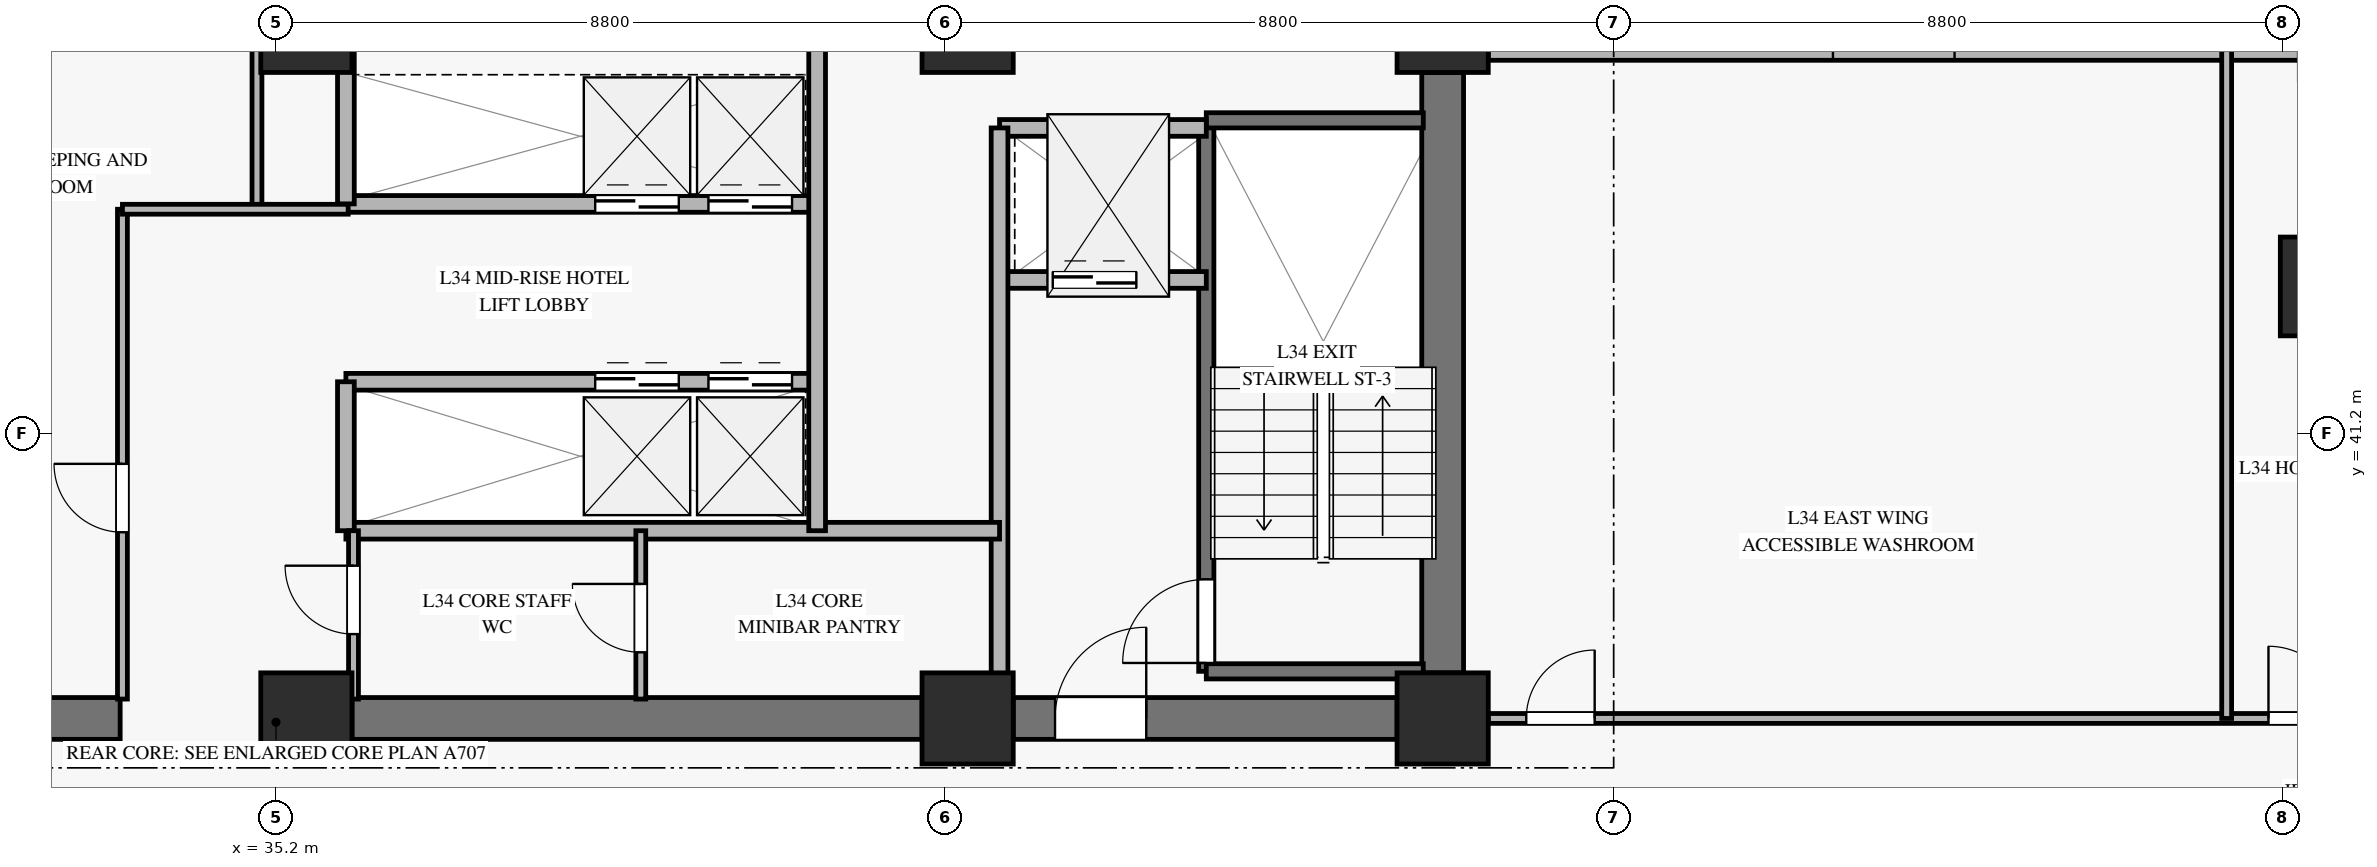
"""IFC4 building model, lengths in metres.
Left out: names, types, materials, properties, quantities, classifications, styles, units other than length and angle.
Written with IfcOpenShell. Run it as: python <this file> out.ifc"""

import sys

from ifc_helpers import new_model, si_unit, direction, frame, frame_2d, origin, origin_2d, place, context, subcontext, project, spatial, rectangle, hollow_rectangle, extrude, source, transform, mapped, element, fill, save


model = new_model("IFC4")
c1 = context("Model", 3, precision=1e-05, world=origin(), true_north=direction((0.0, 1.0)))
c2 = subcontext(c1, "Body", "Model", "MODEL_VIEW")
j1 = project(units=[si_unit("LENGTHUNIT", "METRE"), si_unit("PLANEANGLEUNIT", "RADIAN")], contexts=[c1])
p1 = place(None, origin())
s1 = spatial("IfcSite", under=j1, at=p1, CompositionType="ELEMENT")
p2 = place(p1, origin())
s2 = spatial("IfcBuilding", under=s1, at=p2, CompositionType="ELEMENT")
p3 = place(p2, frame((0.0, 0.0, 141.2)))
s3 = spatial("IfcBuildingStorey", under=s2, at=p3, CompositionType="ELEMENT", Elevation=141.2)
m1 = source(origin(), c2, "Body", "SweptSolid", [
    extrude(rectangle(XDim=1.2, YDim=1.2, at=origin_2d()), origin(), (0.0, 0.0, 1.0), 3.22),
])
for number, where, z_axis, x_axis in (
    (1, (35.6, 37.45, 0.0), (0.0, 0.0, 1.0), (1.0, 0.0, 0.0)),
    (2, (35.6, 46.55, 0.0), (0.0, 0.0, 1.0), (1.0, 0.0, 0.0)),
    (3, (44.3, 37.45, 0.0), (0.0, 0.0, 1.0), (1.0, 0.0, 0.0)),
    (4, (44.3, 46.55, 0.0), (0.0, 0.0, 1.0), (1.0, 0.0, 0.0)),
    (5, (50.55, 37.45, 0.0), (0.0, 0.0, 1.0), (1.0, 0.0, 0.0)),
    (6, (50.55, 46.55, 0.0), (0.0, 0.0, 1.0), (1.0, 0.0, 0.0)),
):
    element("IfcColumn", number, at=place(p3, frame(where, z_axis=z_axis, x_axis=x_axis)), inside=s3, PredefinedType="PILASTER", context=c2, shape_type="MappedRepresentation", body=[
        mapped(m1, transform((0.0, 0.0, 0.0), x_axis=(1.0, 0.0, 0.0), y_axis=(0.0, 1.0, 0.0), z_axis=(0.0, 0.0, 1.0), scale=1.0)),
    ])
p4 = place(p3, frame((31.4, 37.45, 0.0), z_axis=(0.0, 0.0, 1.0), x_axis=(1.0, 0.0, 0.0)))
e7 = element("IfcWall", 7, at=p4, inside=s3, PredefinedType="SHEAR", context=c2, shape_type="SweptSolid", body=[
    extrude(rectangle(XDim=1.75, YDim=0.55, at=frame_2d((0.875, 0.0))), origin(), (0.0, 0.0, 1.0), 3.22),
])
p5 = place(p3, frame((36.2, 37.45, 0.0), z_axis=(0.0, 0.0, 1.0), x_axis=(1.0, 0.0, 0.0)))
e8 = element("IfcWall", 8, at=p5, inside=s3, PredefinedType="SHEAR", context=c2, shape_type="SweptSolid", body=[
    extrude(rectangle(XDim=7.5, YDim=0.55, at=frame_2d((3.75, 0.0))), origin(), (0.0, 0.0, 1.0), 3.22),
])
p6 = place(p3, frame((44.9, 37.45, 0.0), z_axis=(0.0, 0.0, 1.0), x_axis=(1.0, 0.0, 0.0)))
e9 = element("IfcWall", 9, at=p6, inside=s3, PredefinedType="SHEAR", context=c2, shape_type="SweptSolid", body=[
    extrude(rectangle(XDim=5.05, YDim=0.55, at=frame_2d((2.525, 0.0))), origin(), (0.0, 0.0, 1.0), 3.22),
])
p7 = place(p6, frame((0.55, 0.0, 0.0)))
e10 = element("IfcOpeningElement", 10, at=p7, cuts=e9, PredefinedType="OPENING", context=c2, shape_type="SweptSolid", body=[
    extrude(rectangle(XDim=1.2, YDim=2.15, at=frame_2d((0.6, 1.075))), frame((0.0, 0.285, 0.0), z_axis=(0.0, -1.0, 0.0), x_axis=(1.0, 0.0, 0.0)), (0.0, 0.0, 1.0), 0.57),
])
p8 = place(p3, frame((50.55, 38.05, 0.0), z_axis=(0.0, 0.0, 1.0), x_axis=(0.0, 1.0, 0.0)))
e11 = element("IfcWall", 11, at=p8, inside=s3, PredefinedType="SHEAR", context=c2, shape_type="SweptSolid", body=[
    extrude(rectangle(XDim=7.9, YDim=0.55, at=frame_2d((3.95, 0.0))), origin(), (0.0, 0.0, 1.0), 3.22),
])
m2 = source(origin(), c2, "Body", "SweptSolid", [
    extrude(hollow_rectangle(XDim=1.3, YDim=1.3, WallThickness=0.06, at=origin_2d()), origin(), (0.0, 0.0, 1.0), 3.22),
])
p9 = place(p3, frame((62.221, 43.134, 0.0), z_axis=(0.0, 0.0, 1.0), x_axis=(1.0, 0.0, 0.0)))
e12 = element("IfcColumn", 12, at=p9, inside=s3, PredefinedType="COLUMN", context=c2, shape_type="MappedRepresentation", body=[
    mapped(m2, transform((0.0, 0.0, 0.0), x_axis=(1.0, 0.0, 0.0), y_axis=(0.0, 1.0, 0.0), z_axis=(0.0, 0.0, 1.0), scale=1.0)),
])
p10 = place(p3, frame((51.15, 46.25, 0.0), z_axis=(0.0, 0.0, 1.0), x_axis=(1.0, 0.0, 0.0)))
e13 = element("IfcWall", 13, at=p10, inside=s3, PredefinedType="SOLIDWALL", context=c2, shape_type="SweptSolid", body=[
    extrude(rectangle(XDim=10.671, YDim=0.28, at=frame_2d((5.335, 0.0))), origin(), (0.0, 0.0, 1.0), 2.7),
])
p11 = place(p10, frame((4.535, 0.0, 0.45)))
e14 = element("IfcOpeningElement", 14, at=p11, cuts=e13, PredefinedType="OPENING", context=c2, shape_type="SweptSolid", body=[
    extrude(rectangle(XDim=1.6, YDim=2.0, at=frame_2d((0.8, 1.0))), frame((0.0, 0.15, 0.0), z_axis=(0.0, -1.0, 0.0), x_axis=(1.0, 0.0, 0.0)), (0.0, 0.0, 1.0), 0.3),
])
p12 = place(p3, frame((47.44, 38.07, 0.0), z_axis=(0.0, 0.0, 1.0), x_axis=(0.0, 1.0, 0.0)))
e15 = element("IfcWall", 15, at=p12, inside=s3, PredefinedType="SOLIDWALL", context=c2, shape_type="SweptSolid", body=[
    extrude(rectangle(XDim=7.25, YDim=0.2, at=frame_2d((3.625, 0.0))), origin(), (0.0, 0.0, 1.0), 3.5),
])
p13 = place(p12, frame((0.11, 0.0, 0.0)))
e16 = element("IfcOpeningElement", 16, at=p13, cuts=e15, PredefinedType="OPENING", context=c2, shape_type="SweptSolid", body=[
    extrude(rectangle(XDim=1.1, YDim=2.15, at=frame_2d((0.55, 1.075))), frame((0.0, 0.11, 0.0), z_axis=(0.0, -1.0, 0.0), x_axis=(1.0, 0.0, 0.0)), (0.0, 0.0, 1.0), 0.22),
])
for number, where, z_axis, x_axis in (
    (17, (47.44, 45.32, 0.0), (0.0, 0.0, 1.0), (1.0, 0.0, 0.0)),
    (18, (47.44, 38.07, 0.0), (0.0, 0.0, 1.0), (1.0, 0.0, 0.0)),
):
    element("IfcWall", number, at=place(p3, frame(where, z_axis=z_axis, x_axis=x_axis)), inside=s3, PredefinedType="SOLIDWALL", context=c2, shape_type="SweptSolid", body=[
        extrude(rectangle(XDim=2.855, YDim=0.2, at=frame_2d((1.427, 0.0))), origin(), (0.0, 0.0, 1.0), 3.5),
    ])
p14 = place(p3, frame((44.72, 43.22, 0.0), z_axis=(0.0, 0.0, 1.0), x_axis=(1.0, 0.0, 0.0)))
e19 = element("IfcWall", 19, at=p14, inside=s3, PredefinedType="SOLIDWALL", context=c2, shape_type="SweptSolid", body=[
    extrude(rectangle(XDim=2.72, YDim=0.22, at=frame_2d((1.36, 0.0))), origin(), (0.0, 0.0, 1.0), 3.22),
])
p15 = place(p14, frame((0.7, 0.0, 0.0)))
e20 = element("IfcOpeningElement", 20, at=p15, cuts=e19, PredefinedType="OPENING", context=c2, shape_type="SweptSolid", body=[
    extrude(rectangle(XDim=1.1, YDim=2.2, at=frame_2d((0.55, 1.1))), frame((0.0, 0.12, 0.0), z_axis=(0.0, -1.0, 0.0), x_axis=(1.0, 0.0, 0.0)), (0.0, 0.0, 1.0), 0.24),
])
p16 = place(p3, frame((44.72, 45.22, 0.0), z_axis=(0.0, 0.0, 1.0), x_axis=(1.0, 0.0, 0.0)))
e21 = element("IfcWall", 21, at=p16, inside=s3, PredefinedType="SOLIDWALL", context=c2, shape_type="SweptSolid", body=[
    extrude(rectangle(XDim=2.72, YDim=0.22, at=frame_2d((1.36, 0.0))), origin(), (0.0, 0.0, 1.0), 3.22),
])
p17 = place(p3, frame((44.72, 37.705, 0.0), z_axis=(0.0, 0.0, 1.0), x_axis=(0.0, 1.0, 0.0)))
e22 = element("IfcWall", 22, at=p17, inside=s3, PredefinedType="SOLIDWALL", context=c2, shape_type="SweptSolid", body=[
    extrude(rectangle(XDim=7.515, YDim=0.22, at=frame_2d((3.757, 0.0))), origin(), (0.0, 0.0, 1.0), 3.22),
])
p18 = place(p3, frame((36.12, 44.22, 0.0), z_axis=(0.0, 0.0, 1.0), x_axis=(1.0, 0.0, 0.0)))
e23 = element("IfcWall", 23, at=p18, inside=s3, PredefinedType="SOLIDWALL", context=c2, shape_type="SweptSolid", body=[
    extrude(rectangle(XDim=6.2, YDim=0.22, at=frame_2d((3.1, 0.0))), origin(), (0.0, 0.0, 1.0), 3.22),
])
p19 = place(p18, frame((3.28, 0.0, 0.0)))
e24 = element("IfcOpeningElement", 24, at=p19, cuts=e23, PredefinedType="OPENING", context=c2, shape_type="SweptSolid", body=[
    extrude(rectangle(XDim=1.1, YDim=2.2, at=frame_2d((0.55, 1.1))), frame((0.0, 0.12, 0.0), z_axis=(0.0, -1.0, 0.0), x_axis=(1.0, 0.0, 0.0)), (0.0, 0.0, 1.0), 0.24),
])
p20 = place(p18, frame((4.77, 0.0, 0.0)))
e25 = element("IfcOpeningElement", 25, at=p20, cuts=e23, PredefinedType="OPENING", context=c2, shape_type="SweptSolid", body=[
    extrude(rectangle(XDim=1.1, YDim=2.2, at=frame_2d((0.55, 1.1))), frame((0.0, 0.12, 0.0), z_axis=(0.0, -1.0, 0.0), x_axis=(1.0, 0.0, 0.0)), (0.0, 0.0, 1.0), 0.24),
])
p21 = place(p3, frame((36.12, 41.88, 0.0), z_axis=(0.0, 0.0, 1.0), x_axis=(1.0, 0.0, 0.0)))
e26 = element("IfcWall", 26, at=p21, inside=s3, PredefinedType="SOLIDWALL", context=c2, shape_type="SweptSolid", body=[
    extrude(rectangle(XDim=6.2, YDim=0.22, at=frame_2d((3.1, 0.0))), origin(), (0.0, 0.0, 1.0), 3.22),
])
p22 = place(p21, frame((3.28, 0.0, 0.0)))
e27 = element("IfcOpeningElement", 27, at=p22, cuts=e26, PredefinedType="OPENING", context=c2, shape_type="SweptSolid", body=[
    extrude(rectangle(XDim=1.1, YDim=2.2, at=frame_2d((0.55, 1.1))), frame((0.0, 0.12, 0.0), z_axis=(0.0, -1.0, 0.0), x_axis=(1.0, 0.0, 0.0)), (0.0, 0.0, 1.0), 0.24),
])
p23 = place(p21, frame((4.77, 0.0, 0.0)))
e28 = element("IfcOpeningElement", 28, at=p23, cuts=e26, PredefinedType="OPENING", context=c2, shape_type="SweptSolid", body=[
    extrude(rectangle(XDim=1.1, YDim=2.2, at=frame_2d((0.55, 1.1))), frame((0.0, 0.12, 0.0), z_axis=(0.0, -1.0, 0.0), x_axis=(1.0, 0.0, 0.0)), (0.0, 0.0, 1.0), 0.24),
])
p24 = place(p3, frame((36.12, 39.92, 0.0), z_axis=(0.0, 0.0, 1.0), x_axis=(1.0, 0.0, 0.0)))
e29 = element("IfcWall", 29, at=p24, inside=s3, PredefinedType="SOLIDWALL", context=c2, shape_type="SweptSolid", body=[
    extrude(rectangle(XDim=8.6, YDim=0.22, at=frame_2d((4.3, 0.0))), origin(), (0.0, 0.0, 1.0), 2.505),
])
p25 = place(p3, frame((42.32, 39.92, 0.0), z_axis=(0.0, 0.0, 1.0), x_axis=(0.0, 1.0, 0.0)))
e30 = element("IfcWall", 30, at=p25, inside=s3, PredefinedType="SOLIDWALL", context=c2, shape_type="SweptSolid", body=[
    extrude(rectangle(XDim=6.375, YDim=0.22, at=frame_2d((3.188, 0.0))), origin(), (0.0, 0.0, 1.0), 3.22),
])
p26 = place(p3, frame((36.12, 39.92, 0.0), z_axis=(0.0, 0.0, 1.0), x_axis=(0.0, 1.0, 0.0)))
e31 = element("IfcWall", 31, at=p26, inside=s3, PredefinedType="SOLIDWALL", context=c2, shape_type="SweptSolid", body=[
    extrude(rectangle(XDim=1.96, YDim=0.22, at=frame_2d((0.98, 0.0))), origin(), (0.0, 0.0, 1.0), 3.22),
])
p27 = place(p3, frame((36.12, 44.22, 0.0), z_axis=(0.0, 0.0, 1.0), x_axis=(0.0, 1.0, 0.0)))
e32 = element("IfcWall", 32, at=p27, inside=s3, PredefinedType="SOLIDWALL", context=c2, shape_type="SweptSolid", body=[
    extrude(rectangle(XDim=2.075, YDim=0.22, at=frame_2d((1.038, 0.0))), origin(), (0.0, 0.0, 1.0), 3.22),
])
p28 = place(p3, frame((33.18, 37.705, 0.0), z_axis=(0.0, 0.0, 1.0), x_axis=(0.0, 1.0, 0.0)))
e33 = element("IfcWall", 33, at=p28, inside=s3, PredefinedType="PARTITIONING", context=c2, shape_type="SweptSolid", body=[
    extrude(rectangle(XDim=6.445, YDim=0.13, at=frame_2d((3.222, 0.0))), origin(), (0.0, 0.0, 1.0), 2.22),
])
p29 = place(p28, frame((2.195, 0.0, 0.0)))
e34 = element("IfcOpeningElement", 34, at=p29, cuts=e33, PredefinedType="OPENING", context=c2, shape_type="SweptSolid", body=[
    extrude(rectangle(XDim=0.9, YDim=2.1, at=frame_2d((0.45, 1.05))), frame((0.0, 0.075, 0.0), z_axis=(0.0, -1.0, 0.0), x_axis=(1.0, 0.0, 0.0)), (0.0, 0.0, 1.0), 0.15),
])
p30 = place(p3, frame((34.95, 44.15, 0.0), z_axis=(0.0, 0.0, 1.0), x_axis=(0.0, 1.0, 0.0)))
e35 = element("IfcWall", 35, at=p30, inside=s3, PredefinedType="PARTITIONING", context=c2, shape_type="SweptSolid", body=[
    extrude(rectangle(XDim=2.145, YDim=0.13, at=frame_2d((1.073, 0.0))), origin(), (0.0, 0.0, 1.0), 3.22),
])
p31 = place(p3, frame((33.18, 44.15, 0.0), z_axis=(0.0, 0.0, 1.0), x_axis=(1.0, 0.0, 0.0)))
e36 = element("IfcWall", 36, at=p31, inside=s3, PredefinedType="PARTITIONING", context=c2, shape_type="SweptSolid", body=[
    extrude(rectangle(XDim=2.97, YDim=0.13, at=frame_2d((1.485, 0.0))), origin(), (0.0, 0.0, 1.0), 2.505),
])
p32 = place(p3, frame((36.22, 37.705, 0.0), z_axis=(0.0, 0.0, 1.0), x_axis=(0.0, 1.0, 0.0)))
e37 = element("IfcWall", 37, at=p32, inside=s3, PredefinedType="PARTITIONING", context=c2, shape_type="SweptSolid", body=[
    extrude(rectangle(XDim=2.215, YDim=0.13, at=frame_2d((1.107, 0.0))), origin(), (0.0, 0.0, 1.0), 3.22),
])
p33 = place(p32, frame((0.855, 0.0, 0.0)))
e38 = element("IfcOpeningElement", 38, at=p33, cuts=e37, PredefinedType="OPENING", context=c2, shape_type="SweptSolid", body=[
    extrude(rectangle(XDim=0.9, YDim=2.1, at=frame_2d((0.45, 1.05))), frame((0.0, 0.075, 0.0), z_axis=(0.0, -1.0, 0.0), x_axis=(1.0, 0.0, 0.0)), (0.0, 0.0, 1.0), 0.15),
])
p34 = place(p3, frame((40.0, 37.705, 0.0), z_axis=(0.0, 0.0, 1.0), x_axis=(0.0, 1.0, 0.0)))
e39 = element("IfcWall", 39, at=p34, inside=s3, PredefinedType="PARTITIONING", context=c2, shape_type="SweptSolid", body=[
    extrude(rectangle(XDim=2.215, YDim=0.13, at=frame_2d((1.107, 0.0))), origin(), (0.0, 0.0, 1.0), 3.22),
])
p35 = place(p34, frame((0.615, 0.0, 0.0)))
e40 = element("IfcOpeningElement", 40, at=p35, cuts=e39, PredefinedType="OPENING", context=c2, shape_type="SweptSolid", body=[
    extrude(rectangle(XDim=0.9, YDim=2.1, at=frame_2d((0.45, 1.05))), frame((0.0, 0.075, 0.0), z_axis=(0.0, -1.0, 0.0), x_axis=(1.0, 0.0, 0.0)), (0.0, 0.0, 1.0), 0.15),
])
p36 = place(p3, frame((51.15, 37.45, 0.0), z_axis=(0.0, 0.0, 1.0), x_axis=(1.0, 0.0, 0.0)))
e41 = element("IfcWall", 41, at=p36, inside=s3, PredefinedType="PARTITIONING", context=c2, shape_type="SweptSolid", body=[
    extrude(rectangle(XDim=14.036, YDim=0.13, at=frame_2d((7.018, 0.0))), origin(), (0.0, 0.0, 1.0), 2.705),
])
p37 = place(p36, frame((0.5, 0.0, 0.0)))
e42 = element("IfcOpeningElement", 42, at=p37, cuts=e41, PredefinedType="OPENING", context=c2, shape_type="SweptSolid", body=[
    extrude(rectangle(XDim=0.9, YDim=2.1, at=frame_2d((0.45, 1.05))), frame((0.0, 0.075, 0.0), z_axis=(0.0, -1.0, 0.0), x_axis=(1.0, 0.0, 0.0)), (0.0, 0.0, 1.0), 0.15),
])
p38 = place(p36, frame((10.265, 0.0, 0.0)))
e43 = element("IfcOpeningElement", 43, at=p38, cuts=e41, PredefinedType="OPENING", context=c2, shape_type="SweptSolid", body=[
    extrude(rectangle(XDim=0.95, YDim=2.1, at=frame_2d((0.475, 1.05))), frame((0.0, 0.075, 0.0), z_axis=(0.0, -1.0, 0.0), x_axis=(1.0, 0.0, 0.0)), (0.0, 0.0, 1.0), 0.15),
])
p39 = place(p3, frame((60.865, 37.45, 0.0), z_axis=(0.0, 0.0, 1.0), x_axis=(0.0, 1.0, 0.0)))
e44 = element("IfcWall", 44, at=p39, inside=s3, PredefinedType="PARTITIONING", context=c2, shape_type="SweptSolid", body=[
    extrude(rectangle(XDim=8.8, YDim=0.13, at=frame_2d((4.4, 0.0))), origin(), (0.0, 0.0, 1.0), 3.22),
])
m3 = source(origin(), c2, "Body", "SweptSolid", [
    extrude(rectangle(XDim=1.1, YDim=2.15, at=frame_2d((0.55, 1.075))), frame((0.0, 0.025, 0.0), z_axis=(0.0, -1.0, 0.0), x_axis=(1.0, 0.0, 0.0)), (0.0, 0.0, 1.0), 0.05),
])
p40 = place(p13, origin())
e45 = element("IfcDoor", 45, at=p40, inside=s3, OperationType="SINGLE_SWING_LEFT", PredefinedType="DOOR", context=c2, shape_type="MappedRepresentation", body=[
    mapped(m3, transform((0.0, 0.0, 0.0), x_axis=(1.0, 0.0, 0.0), y_axis=(0.0, 1.0, 0.0), z_axis=(0.0, 0.0, 1.0), scale=1.0)),
])
fill(e16, e45)
m4 = source(origin(), c2, "Body", "SweptSolid", [
    extrude(rectangle(XDim=1.1, YDim=2.2, at=frame_2d((0.55, 1.1))), frame((0.0, 0.025, 0.0), z_axis=(0.0, -1.0, 0.0), x_axis=(1.0, 0.0, 0.0)), (0.0, 0.0, 1.0), 0.05),
])
p41 = place(p15, origin())
e46 = element("IfcDoor", 46, at=p41, inside=s3, OperationType="SLIDING_TO_LEFT", PredefinedType="DOOR", context=c2, shape_type="MappedRepresentation", body=[
    mapped(m4, transform((0.0, 0.0, 0.0), x_axis=(1.0, 0.0, 0.0), y_axis=(0.0, 1.0, 0.0), z_axis=(0.0, 0.0, 1.0), scale=1.0)),
])
fill(e20, e46)
m5 = source(origin(), c2, "Body", "SweptSolid", [
    extrude(rectangle(XDim=1.2, YDim=2.15, at=frame_2d((0.6, 1.075))), frame((0.0, 0.025, 0.0), z_axis=(0.0, -1.0, 0.0), x_axis=(1.0, 0.0, 0.0)), (0.0, 0.0, 1.0), 0.05),
])
p42 = place(p7, origin())
e47 = element("IfcDoor", 47, at=p42, inside=s3, OperationType="SINGLE_SWING_RIGHT", PredefinedType="DOOR", context=c2, shape_type="MappedRepresentation", body=[
    mapped(m5, transform((0.0, 0.0, 0.0), x_axis=(1.0, 0.0, 0.0), y_axis=(0.0, 1.0, 0.0), z_axis=(0.0, 0.0, 1.0), scale=1.0)),
])
fill(e10, e47)
p43 = place(p19, origin())
e48 = element("IfcDoor", 48, at=p43, inside=s3, OperationType="SLIDING_TO_LEFT", PredefinedType="DOOR", context=c2, shape_type="MappedRepresentation", body=[
    mapped(m4, transform((0.0, 0.0, 0.0), x_axis=(1.0, 0.0, 0.0), y_axis=(0.0, 1.0, 0.0), z_axis=(0.0, 0.0, 1.0), scale=1.0)),
])
fill(e24, e48)
p44 = place(p20, origin())
e49 = element("IfcDoor", 49, at=p44, inside=s3, OperationType="SLIDING_TO_LEFT", PredefinedType="DOOR", context=c2, shape_type="MappedRepresentation", body=[
    mapped(m4, transform((0.0, 0.0, 0.0), x_axis=(1.0, 0.0, 0.0), y_axis=(0.0, 1.0, 0.0), z_axis=(0.0, 0.0, 1.0), scale=1.0)),
])
fill(e25, e49)
p45 = place(p22, origin())
e50 = element("IfcDoor", 50, at=p45, inside=s3, OperationType="SLIDING_TO_LEFT", PredefinedType="DOOR", context=c2, shape_type="MappedRepresentation", body=[
    mapped(m4, transform((0.0, 0.0, 0.0), x_axis=(1.0, 0.0, 0.0), y_axis=(0.0, 1.0, 0.0), z_axis=(0.0, 0.0, 1.0), scale=1.0)),
])
fill(e27, e50)
p46 = place(p23, origin())
e51 = element("IfcDoor", 51, at=p46, inside=s3, OperationType="SLIDING_TO_LEFT", PredefinedType="DOOR", context=c2, shape_type="MappedRepresentation", body=[
    mapped(m4, transform((0.0, 0.0, 0.0), x_axis=(1.0, 0.0, 0.0), y_axis=(0.0, 1.0, 0.0), z_axis=(0.0, 0.0, 1.0), scale=1.0)),
])
fill(e28, e51)
m6 = source(origin(), c2, "Body", "SweptSolid", [
    extrude(rectangle(XDim=0.9, YDim=2.1, at=frame_2d((0.45, 1.05))), frame((0.0, 0.025, 0.0), z_axis=(0.0, -1.0, 0.0), x_axis=(1.0, 0.0, 0.0)), (0.0, 0.0, 1.0), 0.05),
])
p47 = place(p29, origin())
e52 = element("IfcDoor", 52, at=p47, inside=s3, OperationType="SINGLE_SWING_RIGHT", PredefinedType="DOOR", context=c2, shape_type="MappedRepresentation", body=[
    mapped(m6, transform((0.0, 0.0, 0.0), x_axis=(1.0, 0.0, 0.0), y_axis=(0.0, 1.0, 0.0), z_axis=(0.0, 0.0, 1.0), scale=1.0)),
])
fill(e34, e52)
p48 = place(p33, origin())
e53 = element("IfcDoor", 53, at=p48, inside=s3, OperationType="SINGLE_SWING_RIGHT", PredefinedType="DOOR", context=c2, shape_type="MappedRepresentation", body=[
    mapped(m6, transform((0.0, 0.0, 0.0), x_axis=(1.0, 0.0, 0.0), y_axis=(0.0, 1.0, 0.0), z_axis=(0.0, 0.0, 1.0), scale=1.0)),
])
fill(e38, e53)
p49 = place(p35, origin())
e54 = element("IfcDoor", 54, at=p49, inside=s3, OperationType="SINGLE_SWING_RIGHT", PredefinedType="DOOR", context=c2, shape_type="MappedRepresentation", body=[
    mapped(m6, transform((0.0, 0.0, 0.0), x_axis=(1.0, 0.0, 0.0), y_axis=(0.0, 1.0, 0.0), z_axis=(0.0, 0.0, 1.0), scale=1.0)),
])
fill(e40, e54)
p50 = place(p37, origin())
e55 = element("IfcDoor", 55, at=p50, inside=s3, OperationType="SINGLE_SWING_RIGHT", PredefinedType="DOOR", context=c2, shape_type="MappedRepresentation", body=[
    mapped(m6, transform((0.0, 0.0, 0.0), x_axis=(1.0, 0.0, 0.0), y_axis=(0.0, 1.0, 0.0), z_axis=(0.0, 0.0, 1.0), scale=1.0)),
])
fill(e42, e55)
m7 = source(origin(), c2, "Body", "SweptSolid", [
    extrude(rectangle(XDim=0.95, YDim=2.1, at=frame_2d((0.475, 1.05))), frame((0.0, 0.025, 0.0), z_axis=(0.0, -1.0, 0.0), x_axis=(1.0, 0.0, 0.0)), (0.0, 0.0, 1.0), 0.05),
])
p51 = place(p38, origin())
e56 = element("IfcDoor", 56, at=p51, inside=s3, OperationType="SINGLE_SWING_LEFT", PredefinedType="DOOR", context=c2, shape_type="MappedRepresentation", body=[
    mapped(m7, transform((0.0, 0.0, 0.0), x_axis=(1.0, 0.0, 0.0), y_axis=(0.0, 1.0, 0.0), z_axis=(0.0, 0.0, 1.0), scale=1.0)),
])
fill(e43, e56)
save(model, sys.argv[1])
